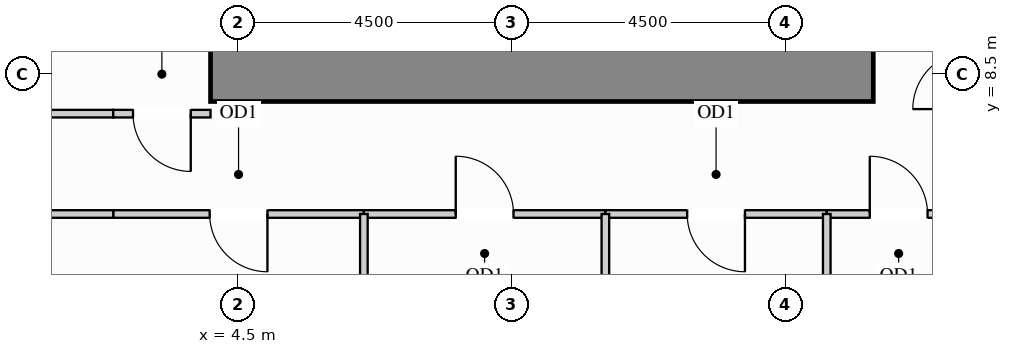
"""IFC4 building model, lengths in metres.
Left out: names, types, materials, properties, quantities, classifications, styles, units other than length and angle.
Written with IfcOpenShell. Run it as: python <this file> out.ifc"""

import sys

from ifc_helpers import new_model, si_unit, direction, frame, frame_2d, origin, place, context, subcontext, project, spatial, rectangle, extrude, source, transform, mapped, element, fill, save


model = new_model("IFC4")
c1 = context("Model", 3, precision=1e-05, world=origin(), true_north=direction((0.0, 1.0)))
c2 = subcontext(c1, "Body", "Model", "MODEL_VIEW")
j1 = project(units=[si_unit("LENGTHUNIT", "METRE"), si_unit("PLANEANGLEUNIT", "RADIAN")], contexts=[c1])
p1 = place(None, origin())
s1 = spatial("IfcSite", under=j1, at=p1, CompositionType="ELEMENT")
p2 = place(p1, origin())
s2 = spatial("IfcBuilding", under=s1, at=p2, CompositionType="ELEMENT")
p3 = place(p2, frame((0.0, 0.0, 51.3)))
s3 = spatial("IfcBuildingStorey", under=s2, at=p3, CompositionType="ELEMENT", Elevation=51.3)
m1 = source(origin(), c2, "Body", "SweptSolid", [
    extrude(rectangle(XDim=10.9, YDim=0.9, at=frame_2d((5.45, 0.0))), origin(), (0.0, 0.0, 1.0), 3.38),
])
p4 = place(p3, frame((4.05, 8.5, 0.0), z_axis=(0.0, 0.0, 1.0), x_axis=(1.0, 0.0, 0.0)))
e1 = element("IfcWall", 1, at=p4, inside=s3, PredefinedType="SHEAR", context=c2, shape_type="MappedRepresentation", body=[
    mapped(m1, transform((0.0, 0.0, 0.0), x_axis=(1.0, 0.0, 0.0), y_axis=(0.0, 1.0, 0.0), z_axis=(0.0, 0.0, 1.0))),
])
m2 = source(origin(), c2, "Body", "SweptSolid", [
    extrude(rectangle(XDim=1.19, YDim=0.125, at=frame_2d((0.595, 0.0))), origin(), (0.0, 0.0, 1.0), 3.365),
])
p5 = place(p3, frame((1.26, 7.85, 0.0), z_axis=(0.0, 0.0, 1.0), x_axis=(1.0, 0.0, 0.0)))
e2 = element("IfcWall", 2, at=p5, inside=s3, PredefinedType="PARTITIONING", context=c2, shape_type="MappedRepresentation", body=[
    mapped(m2, transform((0.0, 0.0, 0.0), x_axis=(1.0, 0.0, 0.0), y_axis=(0.0, 1.0, 0.0), z_axis=(0.0, 0.0, 1.0))),
])
p6 = place(p3, frame((2.45, 7.85, 0.0), z_axis=(0.0, 0.0, 1.0), x_axis=(1.0, 0.0, 0.0)))
e3 = element("IfcWall", 3, at=p6, inside=s3, PredefinedType="PARTITIONING", context=c2, shape_type="SweptSolid", body=[
    extrude(rectangle(XDim=1.6, YDim=0.125, at=frame_2d((0.8, 0.0))), origin(), (0.0, 0.0, 1.0), 3.365),
])
p7 = place(p6, frame((0.325, 0.0, 0.0)))
e4 = element("IfcOpeningElement", 4, at=p7, cuts=e3, PredefinedType="OPENING", context=c2, shape_type="SweptSolid", body=[
    extrude(rectangle(XDim=0.95, YDim=2.15, at=frame_2d((0.475, 1.075))), frame((0.0, 0.073, 0.0), z_axis=(0.0, -1.0, 0.0), x_axis=(1.0, 0.0, 0.0)), (0.0, 0.0, 1.0), 0.145),
])
p8 = place(p3, frame((2.45, 6.2, 0.0), z_axis=(0.0, 0.0, 1.0), x_axis=(1.0, 0.0, 0.0)))
e5 = element("IfcWall", 5, at=p8, inside=s3, PredefinedType="PARTITIONING", context=c2, shape_type="SweptSolid", body=[
    extrude(rectangle(XDim=4.122, YDim=0.125, at=frame_2d((2.061, 0.0))), origin(), (0.0, 0.0, 1.0), 2.828),
])
p9 = place(p8, frame((1.586, 0.0, 0.0)))
e6 = element("IfcOpeningElement", 6, at=p9, cuts=e5, PredefinedType="OPENING", context=c2, shape_type="SweptSolid", body=[
    extrude(rectangle(XDim=0.95, YDim=2.15, at=frame_2d((0.475, 1.075))), frame((0.0, 0.073, 0.0), z_axis=(0.0, -1.0, 0.0), x_axis=(1.0, 0.0, 0.0)), (0.0, 0.0, 1.0), 0.145),
])
p10 = place(p3, frame((6.572, 6.2, 0.0), z_axis=(0.0, 0.0, 1.0), x_axis=(1.0, 0.0, 0.0)))
e7 = element("IfcWall", 7, at=p10, inside=s3, PredefinedType="PARTITIONING", context=c2, shape_type="SweptSolid", body=[
    extrude(rectangle(XDim=3.972, YDim=0.125, at=frame_2d((1.986, 0.0))), origin(), (0.0, 0.0, 1.0), 2.828),
])
p11 = place(p10, frame((1.511, 0.0, 0.0)))
e8 = element("IfcOpeningElement", 8, at=p11, cuts=e7, PredefinedType="OPENING", context=c2, shape_type="SweptSolid", body=[
    extrude(rectangle(XDim=0.95, YDim=2.15, at=frame_2d((0.475, 1.075))), frame((0.0, 0.073, 0.0), z_axis=(0.0, -1.0, 0.0), x_axis=(1.0, 0.0, 0.0)), (0.0, 0.0, 1.0), 0.145),
])
p12 = place(p3, frame((10.544, 6.2, 0.0), z_axis=(0.0, 0.0, 1.0), x_axis=(1.0, 0.0, 0.0)))
e9 = element("IfcWall", 9, at=p12, inside=s3, PredefinedType="PARTITIONING", context=c2, shape_type="SweptSolid", body=[
    extrude(rectangle(XDim=3.641, YDim=0.125, at=frame_2d((1.821, 0.0))), origin(), (0.0, 0.0, 1.0), 2.828),
])
p13 = place(p12, frame((1.345, 0.0, 0.0)))
e10 = element("IfcOpeningElement", 10, at=p13, cuts=e9, PredefinedType="OPENING", context=c2, shape_type="SweptSolid", body=[
    extrude(rectangle(XDim=0.95, YDim=2.15, at=frame_2d((0.475, 1.075))), frame((0.0, 0.073, 0.0), z_axis=(0.0, -1.0, 0.0), x_axis=(1.0, 0.0, 0.0)), (0.0, 0.0, 1.0), 0.145),
])
p14 = place(p3, frame((14.185, 6.2, 0.0), z_axis=(0.0, 0.0, 1.0), x_axis=(1.0, 0.0, 0.0)))
e11 = element("IfcWall", 11, at=p14, inside=s3, PredefinedType="PARTITIONING", context=c2, shape_type="SweptSolid", body=[
    extrude(rectangle(XDim=2.365, YDim=0.125, at=frame_2d((1.183, 0.0))), origin(), (0.0, 0.0, 1.0), 2.828),
])
p15 = place(p14, frame((0.708, 0.0, 0.0)))
e12 = element("IfcOpeningElement", 12, at=p15, cuts=e11, PredefinedType="OPENING", context=c2, shape_type="SweptSolid", body=[
    extrude(rectangle(XDim=0.95, YDim=2.15, at=frame_2d((0.475, 1.075))), frame((0.0, 0.073, 0.0), z_axis=(0.0, -1.0, 0.0), x_axis=(1.0, 0.0, 0.0)), (0.0, 0.0, 1.0), 0.145),
])
m3 = source(origin(), c2, "Body", "SweptSolid", [
    extrude(rectangle(XDim=2.098, YDim=0.125, at=frame_2d((1.049, 0.0))), origin(), (0.0, 0.0, 1.0), 2.828),
])
p16 = place(p3, frame((0.352, 6.2, 0.0), z_axis=(0.0, 0.0, 1.0), x_axis=(1.0, 0.0, 0.0)))
e13 = element("IfcWall", 13, at=p16, inside=s3, PredefinedType="PARTITIONING", context=c2, shape_type="MappedRepresentation", body=[
    mapped(m3, transform((0.0, 0.0, 0.0), x_axis=(1.0, 0.0, 0.0), y_axis=(0.0, 1.0, 0.0), z_axis=(0.0, 0.0, 1.0))),
])
m4 = source(origin(), c2, "Body", "SweptSolid", [
    extrude(rectangle(XDim=5.848, YDim=0.125, at=frame_2d((2.924, 0.0))), origin(), (0.0, 0.0, 1.0), 3.365),
])
for number, where, z_axis, x_axis in (
    (14, (6.572, 0.352, 0.0), (0.0, 0.0, 1.0), (0.0, 1.0, 0.0)),
    (15, (10.544, 0.352, 0.0), (0.0, 0.0, 1.0), (0.0, 1.0, 0.0)),
):
    element("IfcWall", number, at=place(p3, frame(where, z_axis=z_axis, x_axis=x_axis)), inside=s3, PredefinedType="PARTITIONING", context=c2, shape_type="MappedRepresentation", body=[
        mapped(m4, transform((0.0, 0.0, 0.0), x_axis=(1.0, 0.0, 0.0), y_axis=(0.0, 1.0, 0.0), z_axis=(0.0, 0.0, 1.0))),
    ])
m5 = source(origin(), c2, "Body", "SweptSolid", [
    extrude(rectangle(XDim=4.94, YDim=0.125, at=frame_2d((2.47, 0.0))), origin(), (0.0, 0.0, 1.0), 3.365),
])
p17 = place(p3, frame((14.185, 1.26, 0.0), z_axis=(0.0, 0.0, 1.0), x_axis=(0.0, 1.0, 0.0)))
e16 = element("IfcWall", 16, at=p17, inside=s3, PredefinedType="PARTITIONING", context=c2, shape_type="MappedRepresentation", body=[
    mapped(m5, transform((0.0, 0.0, 0.0), x_axis=(1.0, 0.0, 0.0), y_axis=(0.0, 1.0, 0.0), z_axis=(0.0, 0.0, 1.0))),
])
m6 = source(origin(), c2, "Body", "SweptSolid", [
    extrude(rectangle(XDim=0.95, YDim=2.15, at=frame_2d((0.475, 1.075))), frame((0.0, 0.025, 0.0), z_axis=(0.0, -1.0, 0.0), x_axis=(1.0, 0.0, 0.0)), (0.0, 0.0, 1.0), 0.05),
])
p18 = place(p9, origin())
e17 = element("IfcDoor", 17, at=p18, inside=s3, OperationType="SINGLE_SWING_RIGHT", PredefinedType="DOOR", context=c2, shape_type="MappedRepresentation", body=[
    mapped(m6, transform((0.0, 0.0, 0.0), x_axis=(1.0, 0.0, 0.0), y_axis=(0.0, 1.0, 0.0), z_axis=(0.0, 0.0, 1.0))),
])
fill(e6, e17)
p19 = place(p11, origin())
e18 = element("IfcDoor", 18, at=p19, inside=s3, OperationType="SINGLE_SWING_LEFT", PredefinedType="DOOR", context=c2, shape_type="MappedRepresentation", body=[
    mapped(m6, transform((0.0, 0.0, 0.0), x_axis=(1.0, 0.0, 0.0), y_axis=(0.0, 1.0, 0.0), z_axis=(0.0, 0.0, 1.0))),
])
fill(e8, e18)
p20 = place(p13, origin())
e19 = element("IfcDoor", 19, at=p20, inside=s3, OperationType="SINGLE_SWING_RIGHT", PredefinedType="DOOR", context=c2, shape_type="MappedRepresentation", body=[
    mapped(m6, transform((0.0, 0.0, 0.0), x_axis=(1.0, 0.0, 0.0), y_axis=(0.0, 1.0, 0.0), z_axis=(0.0, 0.0, 1.0))),
])
fill(e10, e19)
p21 = place(p15, origin())
e20 = element("IfcDoor", 20, at=p21, inside=s3, OperationType="SINGLE_SWING_LEFT", PredefinedType="DOOR", context=c2, shape_type="MappedRepresentation", body=[
    mapped(m6, transform((0.0, 0.0, 0.0), x_axis=(1.0, 0.0, 0.0), y_axis=(0.0, 1.0, 0.0), z_axis=(0.0, 0.0, 1.0))),
])
fill(e12, e20)
p22 = place(p7, origin())
e21 = element("IfcDoor", 21, at=p22, inside=s3, OperationType="SINGLE_SWING_RIGHT", PredefinedType="DOOR", context=c2, shape_type="MappedRepresentation", body=[
    mapped(m6, transform((0.0, 0.0, 0.0), x_axis=(1.0, 0.0, 0.0), y_axis=(0.0, 1.0, 0.0), z_axis=(0.0, 0.0, 1.0))),
])
fill(e4, e21)
save(model, sys.argv[1])
